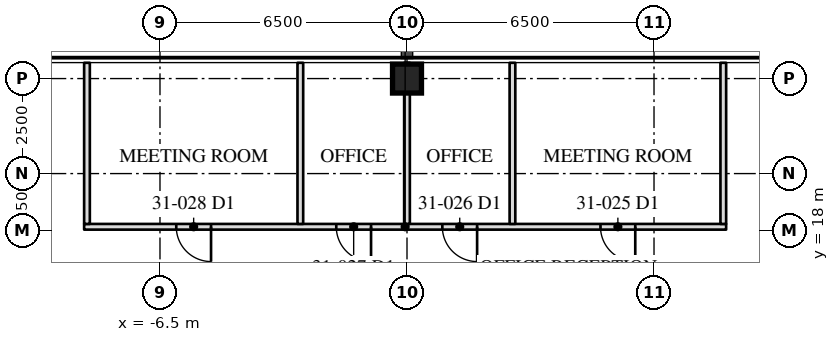
"""IFC4 building model, lengths in metres.
Left out: names, types, materials, properties, quantities, classifications, styles, units other than length and angle.
Written with IfcOpenShell. Run it as: python <this file> out.ifc"""

import sys

from ifc_helpers import new_model, si_unit, direction, frame, frame_2d, origin, origin_2d, place, context, subcontext, project, spatial, rectangle, hollow_rectangle, extrude, element, fill, save


model = new_model("IFC4")
c1 = context("Model", 3, precision=1e-05, world=origin(), true_north=direction((0.0, 1.0)))
c2 = subcontext(c1, "Body", "Model", "MODEL_VIEW")
j1 = project(units=[si_unit("LENGTHUNIT", "METRE"), si_unit("PLANEANGLEUNIT", "RADIAN")], contexts=[c1])
p1 = place(None, origin())
s1 = spatial("IfcSite", under=j1, at=p1, CompositionType="ELEMENT")
p2 = place(p1, origin())
s2 = spatial("IfcBuilding", under=s1, at=p2, CompositionType="ELEMENT")
p3 = place(p2, frame((0.0, 0.0, 133.6)))
s3 = spatial("IfcBuildingStorey", under=s2, at=p3, CompositionType="ELEMENT", Elevation=133.6)
p4 = place(p3, frame((0.0, 22.0, 0.0), z_axis=(0.0, 0.0, 1.0), x_axis=(1.0, 0.0, 0.0)))
e1 = element("IfcColumn", 1, at=p4, inside=s3, PredefinedType="COLUMN", context=c2, shape_type="SweptSolid", body=[
    extrude(hollow_rectangle(XDim=0.762, YDim=0.762, WallThickness=0.076, at=origin_2d()), origin(), (0.0, 0.0, 1.0), 4.1),
])
p5 = place(p3, frame((8.398, 18.1, 0.0), z_axis=(0.0, 0.0, 1.0), x_axis=(-1.0, 0.0, 0.0)))
e2 = element("IfcWall", 2, at=p5, inside=s3, PredefinedType="PARTITIONING", context=c2, shape_type="SweptSolid", body=[
    extrude(rectangle(XDim=16.894, YDim=0.15, at=frame_2d((8.447, 0.0))), origin(), (0.0, 0.0, 1.0), 3.91),
])
p6 = place(p5, frame((2.392, 0.0, 0.0)))
e3 = element("IfcOpeningElement", 3, at=p6, cuts=e2, PredefinedType="OPENING", context=c2, shape_type="SweptSolid", body=[
    extrude(rectangle(XDim=0.915, YDim=2.134, at=frame_2d((0.458, 1.067))), frame((0.0, 0.085, 0.0), z_axis=(0.0, -1.0, 0.0), x_axis=(1.0, 0.0, 0.0)), (0.0, 0.0, 1.0), 0.17),
])
p7 = place(p5, frame((6.553, 0.0, 0.0)))
e4 = element("IfcOpeningElement", 4, at=p7, cuts=e2, PredefinedType="OPENING", context=c2, shape_type="SweptSolid", body=[
    extrude(rectangle(XDim=0.915, YDim=2.134, at=frame_2d((0.458, 1.067))), frame((0.0, 0.085, 0.0), z_axis=(0.0, -1.0, 0.0), x_axis=(1.0, 0.0, 0.0)), (0.0, 0.0, 1.0), 0.17),
])
p8 = place(p5, frame((9.344, 0.0, 0.0)))
e5 = element("IfcOpeningElement", 5, at=p8, cuts=e2, PredefinedType="OPENING", context=c2, shape_type="SweptSolid", body=[
    extrude(rectangle(XDim=0.915, YDim=2.134, at=frame_2d((0.458, 1.067))), frame((0.0, 0.085, 0.0), z_axis=(0.0, -1.0, 0.0), x_axis=(1.0, 0.0, 0.0)), (0.0, 0.0, 1.0), 0.17),
])
p9 = place(p5, frame((13.554, 0.0, 0.0)))
e6 = element("IfcOpeningElement", 6, at=p9, cuts=e2, PredefinedType="OPENING", context=c2, shape_type="SweptSolid", body=[
    extrude(rectangle(XDim=0.915, YDim=2.134, at=frame_2d((0.458, 1.067))), frame((0.0, 0.085, 0.0), z_axis=(0.0, -1.0, 0.0), x_axis=(1.0, 0.0, 0.0)), (0.0, 0.0, 1.0), 0.17),
])
for number, where, z_axis, x_axis in (
    (7, (8.323, 18.175, 0.0), (0.0, 0.0, 1.0), (0.0, 1.0, 0.0)),
    (8, (2.775, 18.175, 0.0), (0.0, 0.0, 1.0), (0.0, 1.0, 0.0)),
):
    element("IfcWall", number, at=place(p3, frame(where, z_axis=z_axis, x_axis=x_axis)), inside=s3, PredefinedType="PARTITIONING", context=c2, shape_type="SweptSolid", body=[
        extrude(rectangle(XDim=4.24, YDim=0.15, at=frame_2d((2.12, 0.0))), origin(), (0.0, 0.0, 1.0), 3.91),
    ])
p10 = place(p3, frame((0.0, 18.175, 0.0), z_axis=(0.0, 0.0, 1.0), x_axis=(0.0, 1.0, 0.0)))
e9 = element("IfcWall", 9, at=p10, inside=s3, PredefinedType="PARTITIONING", context=c2, shape_type="SweptSolid", body=[
    extrude(rectangle(XDim=4.24, YDim=0.15, at=frame_2d((2.12, 0.0))), origin(), (0.0, 0.0, 1.0), 3.326),
])
for number, where, z_axis, x_axis in (
    (10, (-2.807, 18.175, 0.0), (0.0, 0.0, 1.0), (0.0, 1.0, 0.0)),
    (11, (-8.421, 18.175, 0.0), (0.0, 0.0, 1.0), (0.0, 1.0, 0.0)),
):
    element("IfcWall", number, at=place(p3, frame(where, z_axis=z_axis, x_axis=x_axis)), inside=s3, PredefinedType="PARTITIONING", context=c2, shape_type="SweptSolid", body=[
        extrude(rectangle(XDim=4.24, YDim=0.15, at=frame_2d((2.12, 0.0))), origin(), (0.0, 0.0, 1.0), 3.91),
    ])
p11 = place(p6, origin())
e12 = element("IfcDoor", 12, at=p11, inside=s3, OperationType="SINGLE_SWING_LEFT", PredefinedType="DOOR", context=c2, shape_type="SweptSolid", body=[
    extrude(rectangle(XDim=0.915, YDim=2.134, at=frame_2d((0.458, 1.067))), frame((0.0, 0.025, 0.0), z_axis=(0.0, -1.0, 0.0), x_axis=(1.0, 0.0, 0.0)), (0.0, 0.0, 1.0), 0.05),
])
fill(e3, e12)
p12 = place(p7, origin())
e13 = element("IfcDoor", 13, at=p12, inside=s3, OperationType="SINGLE_SWING_LEFT", PredefinedType="DOOR", context=c2, shape_type="SweptSolid", body=[
    extrude(rectangle(XDim=0.915, YDim=2.134, at=frame_2d((0.458, 1.067))), frame((0.0, 0.025, 0.0), z_axis=(0.0, -1.0, 0.0), x_axis=(1.0, 0.0, 0.0)), (0.0, 0.0, 1.0), 0.05),
])
fill(e4, e13)
p13 = place(p8, origin())
e14 = element("IfcDoor", 14, at=p13, inside=s3, OperationType="SINGLE_SWING_LEFT", PredefinedType="DOOR", context=c2, shape_type="SweptSolid", body=[
    extrude(rectangle(XDim=0.915, YDim=2.134, at=frame_2d((0.458, 1.067))), frame((0.0, 0.025, 0.0), z_axis=(0.0, -1.0, 0.0), x_axis=(1.0, 0.0, 0.0)), (0.0, 0.0, 1.0), 0.05),
])
fill(e5, e14)
p14 = place(p9, origin())
e15 = element("IfcDoor", 15, at=p14, inside=s3, OperationType="SINGLE_SWING_LEFT", PredefinedType="DOOR", context=c2, shape_type="SweptSolid", body=[
    extrude(rectangle(XDim=0.915, YDim=2.134, at=frame_2d((0.458, 1.067))), frame((0.0, 0.025, 0.0), z_axis=(0.0, -1.0, 0.0), x_axis=(1.0, 0.0, 0.0)), (0.0, 0.0, 1.0), 0.05),
])
fill(e6, e15)
save(model, sys.argv[1])
